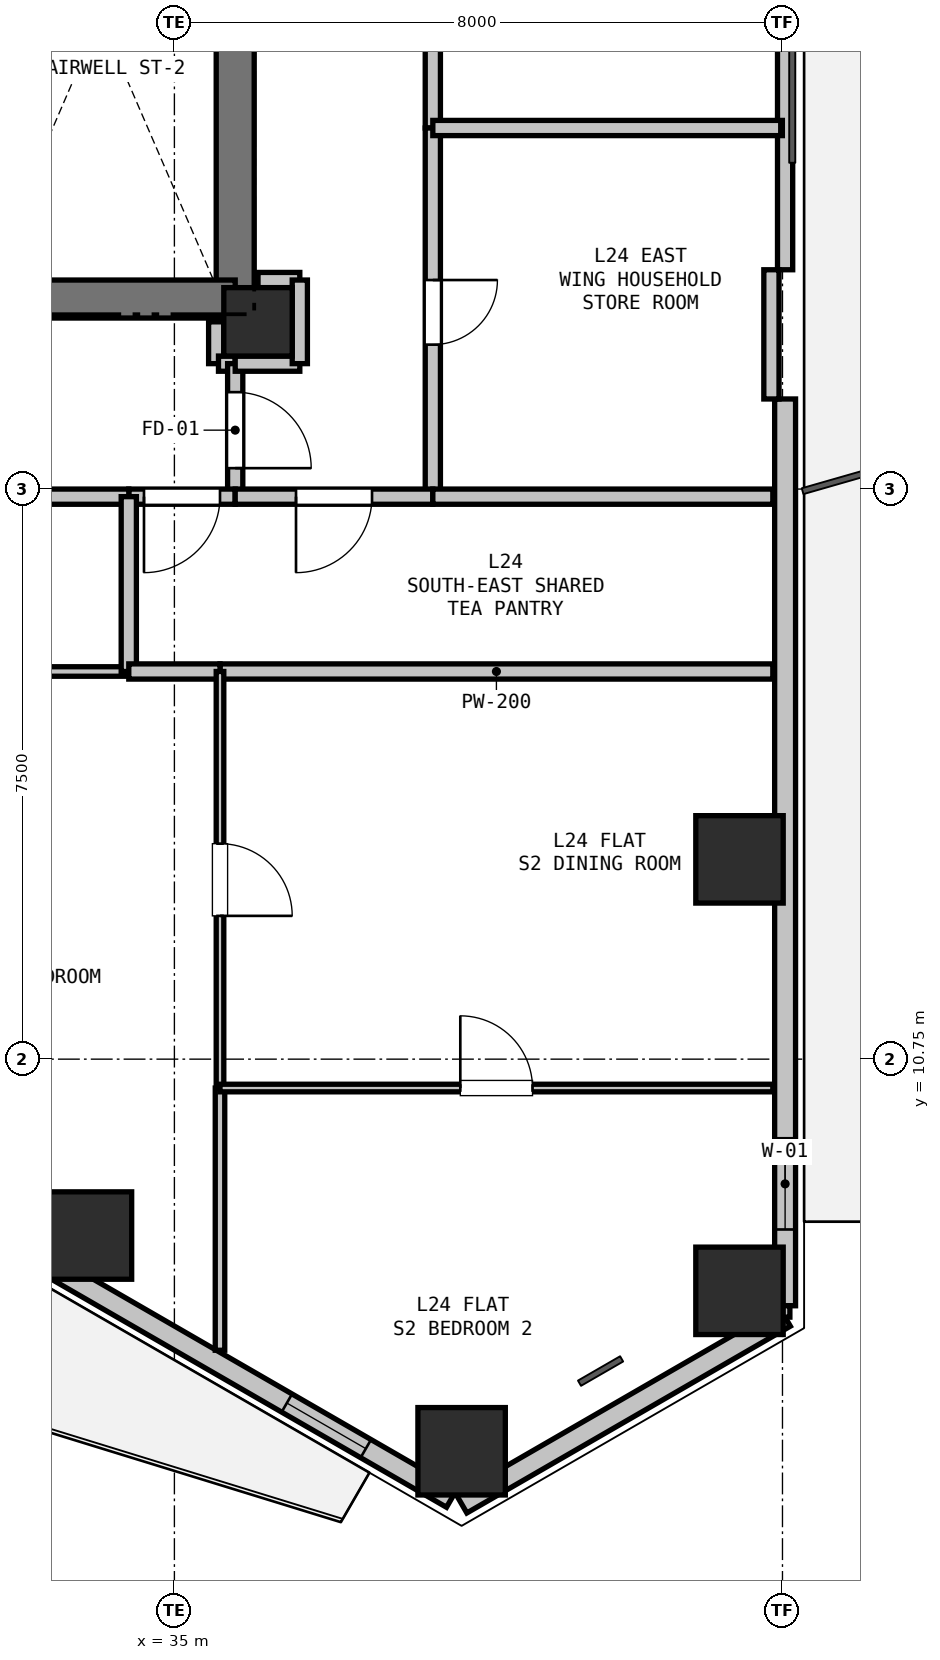
"""IFC4 building model, lengths in metres.
Left out: names, types, materials, properties, quantities, classifications, styles, units other than length and angle.
Written with IfcOpenShell. Run it as: python <this file> out.ifc"""

import sys

from ifc_helpers import new_model, si_unit, direction, frame, frame_2d, origin, origin_2d, place, context, subcontext, project, spatial, rectangle, hollow_rectangle, extrude, element, fill, save


model = new_model("IFC4")
c1 = context("Model", 3, precision=1e-05, world=origin(), true_north=direction((0.0, 1.0)))
c2 = subcontext(c1, "Body", "Model", "MODEL_VIEW")
j1 = project(units=[si_unit("LENGTHUNIT", "METRE"), si_unit("PLANEANGLEUNIT", "RADIAN")], contexts=[c1])
p1 = place(None, origin())
s1 = spatial("IfcSite", under=j1, at=p1, CompositionType="ELEMENT")
p2 = place(p1, origin())
s2 = spatial("IfcBuilding", under=s1, at=p2, CompositionType="ELEMENT")
p3 = place(p2, frame((0.0, 0.0, 90.0)))
s3 = spatial("IfcBuildingStorey", under=s2, at=p3, CompositionType="ELEMENT", Elevation=90.0)
p4 = place(p3, frame((36.1, 20.45, 0.0), z_axis=(0.0, 0.0, 1.0), x_axis=(1.0, 0.0, 0.0)))
e1 = element("IfcColumn", 1, at=p4, inside=s3, PredefinedType="COLUMN", context=c2, shape_type="SweptSolid", body=[
    extrude(rectangle(XDim=0.9, YDim=0.9, at=origin_2d()), origin(), (0.0, 0.0, 1.0), 3.3),
])
for number, where, z_axis, x_axis in (
    (2, (42.435, 13.378, 0.0), (0.0, 0.0, 1.0), (1.0, 0.0, 0.0)),
    (3, (42.435, 7.702, 0.0), (0.0, 0.0, 1.0), (1.0, 0.0, 0.0)),
    (4, (38.779, 5.591, 0.0), (0.0, 0.0, 1.0), (1.0, 0.0, 0.0)),
    (5, (33.863, 8.429, 0.0), (0.0, 0.0, 1.0), (1.0, 0.0, 0.0)),
):
    element("IfcColumn", number, at=place(p3, frame(where, z_axis=z_axis, x_axis=x_axis)), inside=s3, PredefinedType="COLUMN", context=c2, shape_type="SweptSolid", body=[
        extrude(hollow_rectangle(XDim=1.15, YDim=1.15, WallThickness=0.032, at=origin_2d()), origin(), (0.0, 0.0, 1.0), 3.3),
    ])
p5 = place(p3, frame((43.035, 7.356, 0.0), z_axis=(0.0, 0.0, 1.0), x_axis=(-0.866011848704, -0.500023477353, 0.0)))
e6 = element("IfcWall", 6, at=p5, inside=s3, PredefinedType="SOLIDWALL", context=c2, shape_type="SweptSolid", body=[
    extrude(rectangle(XDim=4.914, YDim=0.275, at=frame_2d((2.457, 0.0))), origin(), (0.0, 0.0, 1.0), 2.67),
])
p6 = place(p3, frame((43.035, 32.365, 0.0), z_axis=(0.0, 0.0, 1.0), x_axis=(0.0, -1.0, 0.0)))
e7 = element("IfcWall", 7, at=p6, inside=s3, PredefinedType="PARAPET", context=c2, shape_type="SweptSolid", body=[
    extrude(rectangle(XDim=11.229, YDim=0.2, at=frame_2d((5.615, 0.0))), origin(), (0.0, 0.0, 1.0), 0.2),
])
p7 = place(p3, frame((43.035, 19.435, 0.0), z_axis=(0.0, 0.0, 1.0), x_axis=(0.0, -1.0, 0.0)))
e8 = element("IfcWall", 8, at=p7, inside=s3, PredefinedType="SOLIDWALL", context=c2, shape_type="SweptSolid", body=[
    extrude(rectangle(XDim=11.93, YDim=0.275, at=frame_2d((5.965, 0.0))), origin(), (0.0, 0.0, 1.0), 2.67),
])
p8 = place(p7, frame((9.726, 0.0, 0.9)))
e9 = element("IfcOpeningElement", 9, at=p8, cuts=e8, PredefinedType="OPENING", context=c2, shape_type="SweptSolid", body=[
    extrude(rectangle(XDim=1.2, YDim=1.4, at=frame_2d((0.6, 0.7))), frame((0.0, 0.147, 0.0), z_axis=(0.0, -1.0, 0.0), x_axis=(1.0, 0.0, 0.0)), (0.0, 0.0, 1.0), 0.295),
])
p9 = place(p3, frame((42.854, 21.135, 0.0), z_axis=(0.0, 0.0, 1.0), x_axis=(0.0, -1.0, 0.0)))
e10 = element("IfcWall", 10, at=p9, inside=s3, PredefinedType="PARAPET", context=c2, shape_type="SweptSolid", body=[
    extrude(rectangle(XDim=1.7, YDim=0.2, at=frame_2d((0.85, 0.0))), origin(), (0.0, 0.0, 1.0), 2.67),
])
p10 = place(p3, frame((38.649, 4.973, 0.0), z_axis=(0.0, 0.0, 1.0), x_axis=(-0.866023023012, 0.500004123596, 0.0)))
e11 = element("IfcWall", 11, at=p10, inside=s3, PredefinedType="SOLIDWALL", context=c2, shape_type="SweptSolid", body=[
    extrude(rectangle(XDim=11.93, YDim=0.275, at=frame_2d((5.965, 0.0))), origin(), (0.0, 0.0, 1.0), 2.67),
])
p11 = place(p10, frame((7.616, 0.0, 0.0)))
e12 = element("IfcOpeningElement", 12, at=p11, cuts=e11, PredefinedType="OPENING", context=c2, shape_type="SweptSolid", body=[
    extrude(rectangle(XDim=1.0, YDim=2.1, at=frame_2d((0.5, 1.05))), frame((0.0, 0.147, 0.0), z_axis=(0.0, -1.0, 0.0), x_axis=(1.0, 0.0, 0.0)), (0.0, 0.0, 1.0), 0.295),
])
p12 = place(p10, frame((1.305, 0.0, 0.9)))
e13 = element("IfcOpeningElement", 13, at=p12, cuts=e11, PredefinedType="OPENING", context=c2, shape_type="SweptSolid", body=[
    extrude(rectangle(XDim=1.2, YDim=1.4, at=frame_2d((0.6, 0.7))), frame((0.0, 0.147, 0.0), z_axis=(0.0, -1.0, 0.0), x_axis=(1.0, 0.0, 0.0)), (0.0, 0.0, 1.0), 0.295),
])
p13 = place(p3, frame((35.8, 28.1, 0.0), z_axis=(0.0, 0.0, 1.0), x_axis=(0.0, -1.0, 0.0)))
e14 = element("IfcWall", 14, at=p13, inside=s3, PredefinedType="SHEAR", context=c2, shape_type="SweptSolid", body=[
    extrude(rectangle(XDim=7.35, YDim=0.5, at=frame_2d((3.675, 0.0))), origin(), (0.0, 0.0, 1.0), 3.05),
])
p14 = place(p3, frame((35.8, 20.75, 0.0), z_axis=(0.0, 0.0, 1.0), x_axis=(-1.0, 0.0, 0.0)))
e15 = element("IfcWall", 15, at=p14, inside=s3, PredefinedType="SHEAR", context=c2, shape_type="SweptSolid", body=[
    extrude(rectangle(XDim=3.45, YDim=0.5, at=frame_2d((1.725, 0.0))), origin(), (0.0, 0.0, 1.0), 3.05),
])
p15 = place(p3, frame((35.55, 20.45, 0.0), z_axis=(0.0, 0.0, 1.0), x_axis=(0.0, -1.0, 0.0)))
e16 = element("IfcWall", 16, at=p15, inside=s3, PredefinedType="PARTITIONING", context=c2, shape_type="SweptSolid", body=[
    extrude(rectangle(XDim=0.55, YDim=0.2, at=frame_2d((0.275, 0.0))), origin(), (0.0, 0.0, 1.0), 2.498),
])
p16 = place(p3, frame((35.58, 19.9, 0.0), z_axis=(0.0, 0.0, 1.0), x_axis=(1.0, 0.0, 0.0)))
e17 = element("IfcWall", 17, at=p16, inside=s3, PredefinedType="PARTITIONING", context=c2, shape_type="SweptSolid", body=[
    extrude(rectangle(XDim=0.22, YDim=0.2, at=frame_2d((0.11, 0.0))), origin(), (0.0, 0.0, 1.0), 3.05),
])
p17 = place(p3, frame((35.8, 19.9, 0.0), z_axis=(0.0, 0.0, 1.0), x_axis=(0.0, -1.0, 0.0)))
e18 = element("IfcWall", 18, at=p17, inside=s3, PredefinedType="PARTITIONING", context=c2, shape_type="SweptSolid", body=[
    extrude(rectangle(XDim=1.75, YDim=0.2, at=frame_2d((0.875, 0.0))), origin(), (0.0, 0.0, 1.0), 3.05),
])
p18 = place(p17, frame((0.375, 0.0, 0.0)))
e19 = element("IfcOpeningElement", 19, at=p18, cuts=e18, PredefinedType="OPENING", context=c2, shape_type="SweptSolid", body=[
    extrude(rectangle(XDim=1.0, YDim=2.15, at=frame_2d((0.5, 1.075))), frame((0.0, 0.11, 0.0), z_axis=(0.0, -1.0, 0.0), x_axis=(1.0, 0.0, 0.0)), (0.0, 0.0, 1.0), 0.22),
])
p19 = place(p3, frame((35.8, 18.15, 0.0), z_axis=(0.0, 0.0, 1.0), x_axis=(-1.0, 0.0, 0.0)))
e20 = element("IfcWall", 20, at=p19, inside=s3, PredefinedType="PARTITIONING", context=c2, shape_type="SweptSolid", body=[
    extrude(rectangle(XDim=1.4, YDim=0.2, at=frame_2d((0.7, 0.0))), origin(), (0.0, 0.0, 1.0), 3.05),
])
p20 = place(p19, frame((0.2, 0.0, 0.0)))
e21 = element("IfcOpeningElement", 21, at=p20, cuts=e20, PredefinedType="OPENING", context=c2, shape_type="SweptSolid", body=[
    extrude(rectangle(XDim=1.0, YDim=2.15, at=frame_2d((0.5, 1.075))), frame((0.0, 0.11, 0.0), z_axis=(0.0, -1.0, 0.0), x_axis=(1.0, 0.0, 0.0)), (0.0, 0.0, 1.0), 0.22),
])
p21 = place(p3, frame((34.4, 18.15, 0.0), z_axis=(0.0, 0.0, 1.0), x_axis=(-1.0, 0.0, 0.0)))
e22 = element("IfcWall", 22, at=p21, inside=s3, PredefinedType="PARTITIONING", context=c2, shape_type="SweptSolid", body=[
    extrude(rectangle(XDim=4.0, YDim=0.2, at=frame_2d((2.0, 0.0))), origin(), (0.0, 0.0, 1.0), 3.05),
])
p22 = place(p3, frame((36.65, 21.0, 0.0), z_axis=(0.0, 0.0, 1.0), x_axis=(-1.0, 0.0, 0.0)))
e23 = element("IfcWall", 23, at=p22, inside=s3, PredefinedType="PARTITIONING", context=c2, shape_type="SweptSolid", body=[
    extrude(rectangle(XDim=0.55, YDim=0.2, at=frame_2d((0.275, 0.0))), origin(), (0.0, 0.0, 1.0), 2.498),
])
p23 = place(p3, frame((38.4, 28.5, 0.0), z_axis=(0.0, 0.0, 1.0), x_axis=(0.0, -1.0, 0.0)))
e24 = element("IfcWall", 24, at=p23, inside=s3, PredefinedType="PARTITIONING", context=c2, shape_type="SweptSolid", body=[
    extrude(rectangle(XDim=5.5, YDim=0.2, at=frame_2d((2.75, 0.0))), origin(), (0.0, 0.0, 1.0), 3.05),
])
p24 = place(p23, frame((2.25, 0.0, 0.0)))
e25 = element("IfcOpeningElement", 25, at=p24, cuts=e24, PredefinedType="OPENING", context=c2, shape_type="SweptSolid", body=[
    extrude(rectangle(XDim=1.0, YDim=2.15, at=frame_2d((0.5, 1.075))), frame((0.0, 0.11, 0.0), z_axis=(0.0, -1.0, 0.0), x_axis=(1.0, 0.0, 0.0)), (0.0, 0.0, 1.0), 0.22),
])
p25 = place(p3, frame((38.4, 23.0, 0.0), z_axis=(0.0, 0.0, 1.0), x_axis=(0.0, -1.0, 0.0)))
e26 = element("IfcWall", 26, at=p25, inside=s3, PredefinedType="PARTITIONING", context=c2, shape_type="SweptSolid", body=[
    extrude(rectangle(XDim=4.85, YDim=0.2, at=frame_2d((2.425, 0.0))), origin(), (0.0, 0.0, 1.0), 3.05),
])
p26 = place(p25, frame((2.0, 0.0, 0.0)))
e27 = element("IfcOpeningElement", 27, at=p26, cuts=e26, PredefinedType="OPENING", context=c2, shape_type="SweptSolid", body=[
    extrude(rectangle(XDim=0.85, YDim=2.1, at=frame_2d((0.425, 1.05))), frame((0.0, 0.11, 0.0), z_axis=(0.0, -1.0, 0.0), x_axis=(1.0, 0.0, 0.0)), (0.0, 0.0, 1.0), 0.22),
])
p27 = place(p3, frame((38.4, 18.15, 0.0), z_axis=(0.0, 0.0, 1.0), x_axis=(-1.0, 0.0, 0.0)))
e28 = element("IfcWall", 28, at=p27, inside=s3, PredefinedType="PARTITIONING", context=c2, shape_type="SweptSolid", body=[
    extrude(rectangle(XDim=2.6, YDim=0.2, at=frame_2d((1.3, 0.0))), origin(), (0.0, 0.0, 1.0), 2.423),
])
p28 = place(p27, frame((0.8, 0.0, 0.0)))
e29 = element("IfcOpeningElement", 29, at=p28, cuts=e28, PredefinedType="OPENING", context=c2, shape_type="SweptSolid", body=[
    extrude(rectangle(XDim=1.0, YDim=2.15, at=frame_2d((0.5, 1.075))), frame((0.0, 0.11, 0.0), z_axis=(0.0, -1.0, 0.0), x_axis=(1.0, 0.0, 0.0)), (0.0, 0.0, 1.0), 0.22),
])
p29 = place(p3, frame((35.8, 19.9, 0.0), z_axis=(0.0, 0.0, 1.0), x_axis=(1.0, 0.0, 0.0)))
e30 = element("IfcWall", 30, at=p29, inside=s3, PredefinedType="PARTITIONING", context=c2, shape_type="SweptSolid", body=[
    extrude(rectangle(XDim=0.85, YDim=0.2, at=frame_2d((0.425, 0.0))), origin(), (0.0, 0.0, 1.0), 2.423),
])
p30 = place(p3, frame((36.65, 19.9, 0.0), z_axis=(0.0, 0.0, 1.0), x_axis=(0.0, 1.0, 0.0)))
e31 = element("IfcWall", 31, at=p30, inside=s3, PredefinedType="PARTITIONING", context=c2, shape_type="SweptSolid", body=[
    extrude(rectangle(XDim=1.1, YDim=0.2, at=frame_2d((0.55, 0.0))), origin(), (0.0, 0.0, 1.0), 3.05),
])
p31 = place(p3, frame((34.4, 15.85, 0.0), z_axis=(0.0, 0.0, 1.0), x_axis=(-1.0, 0.0, 0.0)))
e32 = element("IfcWall", 32, at=p31, inside=s3, PredefinedType="PARTITIONING", context=c2, shape_type="SweptSolid", body=[
    extrude(rectangle(XDim=4.0, YDim=0.125, at=frame_2d((2.0, 0.0))), origin(), (0.0, 0.0, 1.0), 3.05),
])
p32 = place(p31, frame((1.55, 0.0, 0.0)))
e33 = element("IfcOpeningElement", 33, at=p32, cuts=e32, PredefinedType="OPENING", context=c2, shape_type="SweptSolid", body=[
    extrude(rectangle(XDim=0.9, YDim=2.1, at=frame_2d((0.45, 1.05))), frame((0.0, 0.073, 0.0), z_axis=(0.0, -1.0, 0.0), x_axis=(1.0, 0.0, 0.0)), (0.0, 0.0, 1.0), 0.145),
])
p33 = place(p3, frame((34.4, 18.15, 0.0), z_axis=(0.0, 0.0, 1.0), x_axis=(0.0, -1.0, 0.0)))
e34 = element("IfcWall", 34, at=p33, inside=s3, PredefinedType="PARTITIONING", context=c2, shape_type="SweptSolid", body=[
    extrude(rectangle(XDim=2.3, YDim=0.2, at=frame_2d((1.15, 0.0))), origin(), (0.0, 0.0, 1.0), 3.05),
])
p34 = place(p3, frame((38.4, 18.15, 0.0), z_axis=(0.0, 0.0, 1.0), x_axis=(1.0, 0.0, 0.0)))
e35 = element("IfcWall", 35, at=p34, inside=s3, PredefinedType="PARTITIONING", context=c2, shape_type="SweptSolid", body=[
    extrude(rectangle(XDim=4.473, YDim=0.2, at=frame_2d((2.237, 0.0))), origin(), (0.0, 0.0, 1.0), 2.365),
])
p35 = place(p3, frame((42.873, 15.85, 0.0), z_axis=(0.0, 0.0, 1.0), x_axis=(-1.0, 0.0, 0.0)))
e36 = element("IfcWall", 36, at=p35, inside=s3, PredefinedType="PARTITIONING", context=c2, shape_type="SweptSolid", body=[
    extrude(rectangle(XDim=7.273, YDim=0.2, at=frame_2d((3.636, 0.0))), origin(), (0.0, 0.0, 1.0), 2.365),
])
p36 = place(p3, frame((35.6, 15.85, 0.0), z_axis=(0.0, 0.0, 1.0), x_axis=(-1.0, 0.0, 0.0)))
e37 = element("IfcWall", 37, at=p36, inside=s3, PredefinedType="PARTITIONING", context=c2, shape_type="SweptSolid", body=[
    extrude(rectangle(XDim=1.2, YDim=0.2, at=frame_2d((0.6, 0.0))), origin(), (0.0, 0.0, 1.0), 3.05),
])
p37 = place(p3, frame((42.999, 23.0, 0.0), z_axis=(0.0, 0.0, 1.0), x_axis=(-1.0, 0.0, 0.0)))
e38 = element("IfcWall", 38, at=p37, inside=s3, PredefinedType="PARTITIONING", context=c2, shape_type="SweptSolid", body=[
    extrude(rectangle(XDim=4.599, YDim=0.2, at=frame_2d((2.299, 0.0))), origin(), (0.0, 0.0, 1.0), 2.365),
])
p38 = place(p3, frame((35.6, 15.85, 0.0), z_axis=(0.0, 0.0, 1.0), x_axis=(0.0, -1.0, 0.0)))
e39 = element("IfcWall", 39, at=p38, inside=s3, PredefinedType="PARTITIONING", context=c2, shape_type="SweptSolid", body=[
    extrude(rectangle(XDim=5.48, YDim=0.1, at=frame_2d((2.74, 0.0))), origin(), (0.0, 0.0, 1.0), 3.05),
])
p39 = place(p38, frame((2.265, 0.0, 0.0)))
e40 = element("IfcOpeningElement", 40, at=p39, cuts=e39, PredefinedType="OPENING", context=c2, shape_type="SweptSolid", body=[
    extrude(rectangle(XDim=0.95, YDim=2.1, at=frame_2d((0.475, 1.05))), frame((0.0, 0.06, 0.0), z_axis=(0.0, -1.0, 0.0), x_axis=(1.0, 0.0, 0.0)), (0.0, 0.0, 1.0), 0.12),
])
p40 = place(p3, frame((35.6, 10.37, 0.0), z_axis=(0.0, 0.0, 1.0), x_axis=(0.0, -1.0, 0.0)))
e41 = element("IfcWall", 41, at=p40, inside=s3, PredefinedType="PARTITIONING", context=c2, shape_type="SweptSolid", body=[
    extrude(rectangle(XDim=3.45, YDim=0.125, at=frame_2d((1.725, 0.0))), origin(), (0.0, 0.0, 1.0), 2.66),
])
p41 = place(p3, frame((35.6, 10.37, 0.0), z_axis=(0.0, 0.0, 1.0), x_axis=(1.0, 0.0, 0.0)))
e42 = element("IfcWall", 42, at=p41, inside=s3, PredefinedType="PARTITIONING", context=c2, shape_type="SweptSolid", body=[
    extrude(rectangle(XDim=7.273, YDim=0.1, at=frame_2d((3.636, 0.0))), origin(), (0.0, 0.0, 1.0), 2.423),
])
p42 = place(p41, frame((3.162, 0.0, 0.0)))
e43 = element("IfcOpeningElement", 43, at=p42, cuts=e42, PredefinedType="OPENING", context=c2, shape_type="SweptSolid", body=[
    extrude(rectangle(XDim=0.95, YDim=2.1, at=frame_2d((0.475, 1.05))), frame((0.0, 0.06, 0.0), z_axis=(0.0, -1.0, 0.0), x_axis=(1.0, 0.0, 0.0)), (0.0, 0.0, 1.0), 0.12),
])
p43 = place(p3, frame((43.035, 7.506, 0.0), z_axis=(0.0, 0.0, 1.0), x_axis=(0.0, -1.0, 0.0)))
e44 = element("IfcWall", 44, at=p43, inside=s3, PredefinedType="PARTITIONING", context=c2, shape_type="SweptSolid", body=[
    extrude(rectangle(XDim=0.15, YDim=0.125, at=frame_2d((0.075, 0.0))), origin(), (0.0, 0.0, 1.0), 3.05),
])
p44 = place(p8, origin())
e45 = element("IfcWindow", 45, at=p44, inside=s3, PartitioningType="SINGLE_PANEL", PredefinedType="WINDOW", context=c2, shape_type="SweptSolid", body=[
    extrude(rectangle(XDim=1.2, YDim=1.4, at=frame_2d((0.6, 0.7))), frame((0.0, 0.03, 0.0), z_axis=(0.0, -1.0, 0.0), x_axis=(1.0, 0.0, 0.0)), (0.0, 0.0, 1.0), 0.06),
])
fill(e9, e45)
p45 = place(p12, origin())
e46 = element("IfcWindow", 46, at=p45, inside=s3, PartitioningType="SINGLE_PANEL", PredefinedType="WINDOW", context=c2, shape_type="SweptSolid", body=[
    extrude(rectangle(XDim=1.2, YDim=1.4, at=frame_2d((0.6, 0.7))), frame((0.0, 0.03, 0.0), z_axis=(0.0, -1.0, 0.0), x_axis=(1.0, 0.0, 0.0)), (0.0, 0.0, 1.0), 0.06),
])
fill(e13, e46)
p46 = place(p18, origin())
e47 = element("IfcDoor", 47, at=p46, inside=s3, OperationType="SINGLE_SWING_RIGHT", PredefinedType="DOOR", context=c2, shape_type="SweptSolid", body=[
    extrude(rectangle(XDim=1.0, YDim=2.15, at=frame_2d((0.5, 1.075))), frame((0.0, 0.025, 0.0), z_axis=(0.0, -1.0, 0.0), x_axis=(1.0, 0.0, 0.0)), (0.0, 0.0, 1.0), 0.05),
])
fill(e19, e47)
p47 = place(p20, origin())
e48 = element("IfcDoor", 48, at=p47, inside=s3, OperationType="SINGLE_SWING_RIGHT", PredefinedType="DOOR", context=c2, shape_type="SweptSolid", body=[
    extrude(rectangle(XDim=1.0, YDim=2.15, at=frame_2d((0.5, 1.075))), frame((0.0, 0.025, 0.0), z_axis=(0.0, -1.0, 0.0), x_axis=(1.0, 0.0, 0.0)), (0.0, 0.0, 1.0), 0.05),
])
fill(e21, e48)
p48 = place(p28, origin())
e49 = element("IfcDoor", 49, at=p48, inside=s3, OperationType="SINGLE_SWING_RIGHT", PredefinedType="DOOR", context=c2, shape_type="SweptSolid", body=[
    extrude(rectangle(XDim=1.0, YDim=2.15, at=frame_2d((0.5, 1.075))), frame((0.0, 0.025, 0.0), z_axis=(0.0, -1.0, 0.0), x_axis=(1.0, 0.0, 0.0)), (0.0, 0.0, 1.0), 0.05),
])
fill(e29, e49)
p49 = place(p26, origin())
e50 = element("IfcDoor", 50, at=p49, inside=s3, OperationType="SINGLE_SWING_LEFT", PredefinedType="DOOR", context=c2, shape_type="SweptSolid", body=[
    extrude(rectangle(XDim=0.85, YDim=2.1, at=frame_2d((0.425, 1.05))), frame((0.0, 0.025, 0.0), z_axis=(0.0, -1.0, 0.0), x_axis=(1.0, 0.0, 0.0)), (0.0, 0.0, 1.0), 0.05),
])
fill(e27, e50)
p50 = place(p39, origin())
e51 = element("IfcDoor", 51, at=p50, inside=s3, OperationType="SINGLE_SWING_RIGHT", PredefinedType="DOOR", context=c2, shape_type="SweptSolid", body=[
    extrude(rectangle(XDim=0.95, YDim=2.1, at=frame_2d((0.475, 1.05))), frame((0.0, 0.025, 0.0), z_axis=(0.0, -1.0, 0.0), x_axis=(1.0, 0.0, 0.0)), (0.0, 0.0, 1.0), 0.05),
])
fill(e40, e51)
p51 = place(p42, origin())
e52 = element("IfcDoor", 52, at=p51, inside=s3, OperationType="SINGLE_SWING_LEFT", PredefinedType="DOOR", context=c2, shape_type="SweptSolid", body=[
    extrude(rectangle(XDim=0.95, YDim=2.1, at=frame_2d((0.475, 1.05))), frame((0.0, 0.025, 0.0), z_axis=(0.0, -1.0, 0.0), x_axis=(1.0, 0.0, 0.0)), (0.0, 0.0, 1.0), 0.05),
])
fill(e43, e52)
save(model, sys.argv[1])
